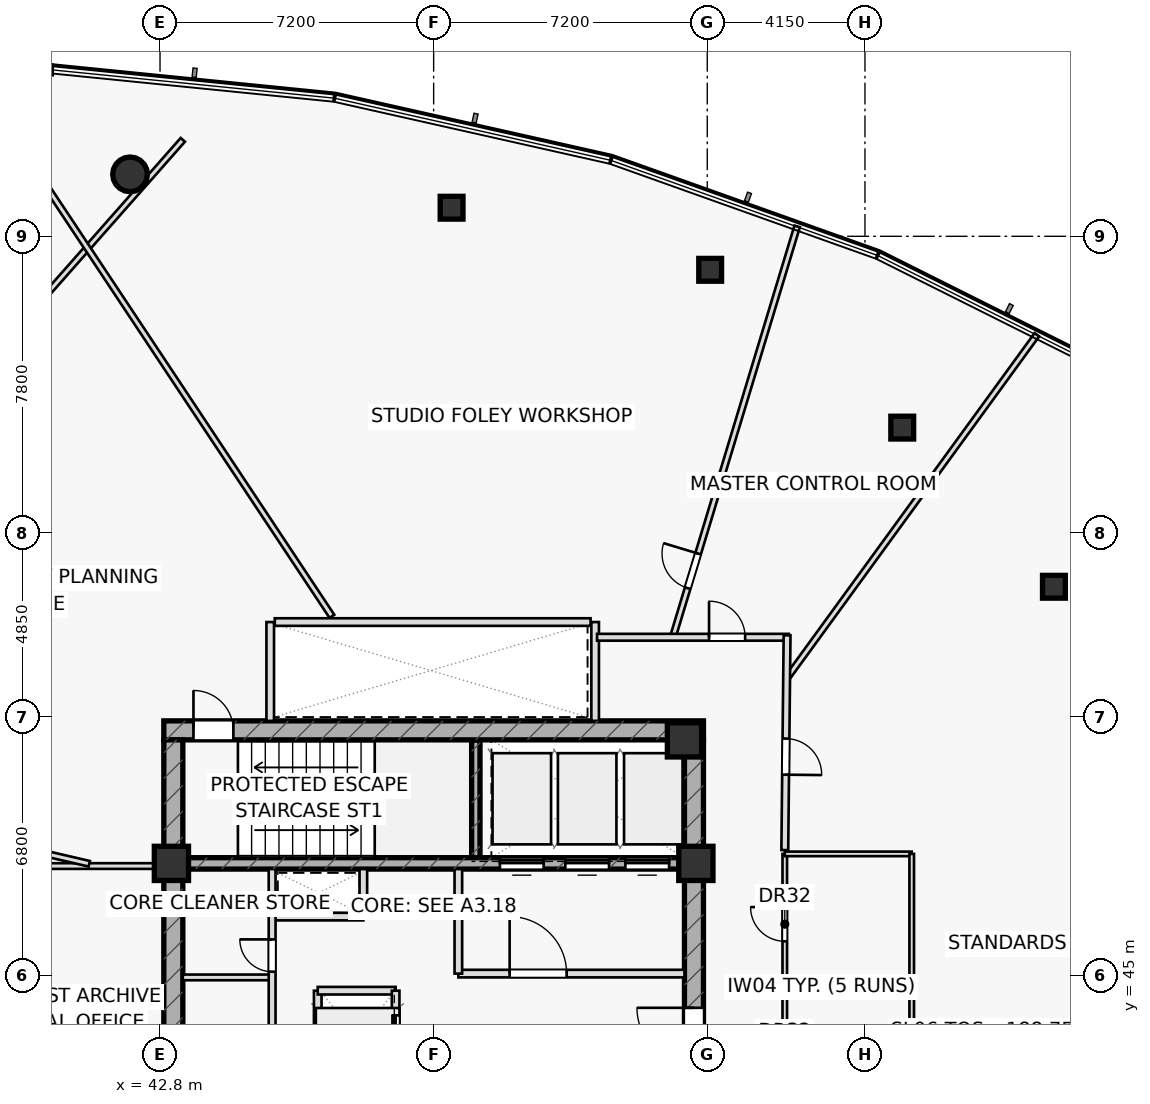
"""IFC4 building model, lengths in metres.
Left out: names, types, materials, properties, quantities, classifications, styles, units other than length and angle.
Written with IfcOpenShell. Run it as: python <this file> out.ifc"""

import sys

from ifc_helpers import new_model, si_unit, direction, frame, frame_2d, origin, origin_2d, place, context, subcontext, project, spatial, rectangle, hollow_rectangle, hollow_circle, extrude, element, fill, save


model = new_model("IFC4")
c1 = context("Model", 3, precision=1e-05, world=origin(), true_north=direction((0.0, 1.0)))
c2 = subcontext(c1, "Body", "Model", "MODEL_VIEW")
j1 = project(units=[si_unit("LENGTHUNIT", "METRE"), si_unit("PLANEANGLEUNIT", "RADIAN")], contexts=[c1])
p1 = place(None, origin())
s1 = spatial("IfcSite", under=j1, at=p1, CompositionType="ELEMENT")
p2 = place(p1, origin())
s2 = spatial("IfcBuilding", under=s1, at=p2, CompositionType="ELEMENT")
p3 = place(p2, frame((0.0, 0.0, 188.75)))
s3 = spatial("IfcBuildingStorey", under=s2, at=p3, CompositionType="ELEMENT", Elevation=188.75)
p4 = place(p3, frame((51.11, 48.1, 0.0), z_axis=(0.0, 0.0, 1.0), x_axis=(0.0, 1.0, 0.0)))
e1 = element("IfcWall", 1, at=p4, inside=s3, PredefinedType="SHEAR", context=c2, shape_type="SweptSolid", body=[
    extrude(rectangle(XDim=3.1, YDim=0.22, at=frame_2d((1.55, 0.0))), origin(), (0.0, 0.0, 1.0), 3.55),
])
p5 = place(p3, frame((42.9, 51.45, 0.0), z_axis=(0.0, 0.0, 1.0), x_axis=(1.0, 0.0, 0.0)))
e2 = element("IfcWall", 2, at=p5, inside=s3, PredefinedType="SHEAR", context=c2, shape_type="SweptSolid", body=[
    extrude(rectangle(XDim=14.2, YDim=0.5, at=frame_2d((7.1, 0.0))), origin(), (0.0, 0.0, 1.0), 3.55),
])
p6 = place(p5, frame((0.78, 0.0, 0.0)))
e3 = element("IfcOpeningElement", 3, at=p6, cuts=e2, PredefinedType="OPENING", context=c2, shape_type="SweptSolid", body=[
    extrude(rectangle(XDim=1.05, YDim=2.2, at=frame_2d((0.525, 1.1))), frame((0.0, 0.26, 0.0), z_axis=(0.0, -1.0, 0.0), x_axis=(1.0, 0.0, 0.0)), (0.0, 0.0, 1.0), 0.52),
])
p7 = place(p3, frame((43.15, 38.8, 0.0), z_axis=(0.0, 0.0, 1.0), x_axis=(0.0, 1.0, 0.0)))
e4 = element("IfcWall", 4, at=p7, inside=s3, PredefinedType="SHEAR", context=c2, shape_type="SweptSolid", body=[
    extrude(rectangle(XDim=12.4, YDim=0.5, at=frame_2d((6.2, 0.0))), origin(), (0.0, 0.0, 1.0), 3.55),
])
p8 = place(p3, frame((56.85, 38.8, 0.0), z_axis=(0.0, 0.0, 1.0), x_axis=(0.0, 1.0, 0.0)))
e5 = element("IfcWall", 5, at=p8, inside=s3, PredefinedType="SHEAR", context=c2, shape_type="SweptSolid", body=[
    extrude(rectangle(XDim=12.4, YDim=0.5, at=frame_2d((6.2, 0.0))), origin(), (0.0, 0.0, 1.0), 3.55),
])
p9 = place(p8, frame((3.85, 0.0, 0.0)))
e6 = element("IfcOpeningElement", 6, at=p9, cuts=e5, PredefinedType="OPENING", context=c2, shape_type="SweptSolid", body=[
    extrude(rectangle(XDim=1.5, YDim=2.2, at=frame_2d((0.75, 1.1))), frame((0.0, 0.26, 0.0), z_axis=(0.0, -1.0, 0.0), x_axis=(1.0, 0.0, 0.0)), (0.0, 0.0, 1.0), 0.52),
])
p10 = place(p3, frame((43.4, 47.95, 0.0), z_axis=(0.0, 0.0, 1.0), x_axis=(1.0, 0.0, 0.0)))
e7 = element("IfcWall", 7, at=p10, inside=s3, PredefinedType="SHEAR", context=c2, shape_type="SweptSolid", body=[
    extrude(rectangle(XDim=13.2, YDim=0.3, at=frame_2d((6.6, 0.0))), origin(), (0.0, 0.0, 1.0), 3.55),
])
p11 = place(p10, frame((8.345, 0.0, 0.0)))
e8 = element("IfcOpeningElement", 8, at=p11, cuts=e7, PredefinedType="OPENING", context=c2, shape_type="SweptSolid", body=[
    extrude(rectangle(XDim=1.15, YDim=2.2, at=frame_2d((0.575, 1.1))), frame((0.0, 0.16, 0.0), z_axis=(0.0, -1.0, 0.0), x_axis=(1.0, 0.0, 0.0)), (0.0, 0.0, 1.0), 0.32),
])
p12 = place(p10, frame((10.065, 0.0, 0.0)))
e9 = element("IfcOpeningElement", 9, at=p12, cuts=e7, PredefinedType="OPENING", context=c2, shape_type="SweptSolid", body=[
    extrude(rectangle(XDim=1.15, YDim=2.2, at=frame_2d((0.575, 1.1))), frame((0.0, 0.16, 0.0), z_axis=(0.0, -1.0, 0.0), x_axis=(1.0, 0.0, 0.0)), (0.0, 0.0, 1.0), 0.32),
])
p13 = place(p10, frame((11.645, 0.0, 0.0)))
e10 = element("IfcOpeningElement", 10, at=p13, cuts=e7, PredefinedType="OPENING", context=c2, shape_type="SweptSolid", body=[
    extrude(rectangle(XDim=1.15, YDim=2.2, at=frame_2d((0.575, 1.1))), frame((0.0, 0.16, 0.0), z_axis=(0.0, -1.0, 0.0), x_axis=(1.0, 0.0, 0.0)), (0.0, 0.0, 1.0), 0.32),
])
for number, where, z_axis, x_axis in (
    (11, (43.1, 47.95, 0.0), (0.0, 0.0, 1.0), (1.0, 0.0, 0.0)),
    (12, (56.9, 47.95, 0.0), (0.0, 0.0, 1.0), (1.0, 0.0, 0.0)),
    (13, (56.6, 51.2, 0.0), (0.0, 0.0, 1.0), (1.0, 0.0, 0.0)),
):
    element("IfcColumn", number, at=place(p3, frame(where, z_axis=z_axis, x_axis=x_axis)), inside=s3, PredefinedType="COLUMN", context=c2, shape_type="SweptSolid", body=[
        extrude(rectangle(XDim=0.9, YDim=0.9, at=origin_2d()), origin(), (0.0, 0.0, 1.0), 3.55),
    ])
p14 = place(p3, frame((42.011, 66.08, 0.0), z_axis=(0.0, 0.0, 1.0), x_axis=(1.0, 0.0, 0.0)))
e14 = element("IfcColumn", 14, at=p14, inside=s3, PredefinedType="COLUMN", context=c2, shape_type="SweptSolid", body=[
    extrude(hollow_circle(Radius=0.457, WallThickness=0.04, at=origin_2d()), origin(), (0.0, 0.0, 1.0), 3.55),
])
for number, where, z_axis, x_axis in (
    (15, (66.322, 55.229, 0.0), (0.0, 0.0, 1.0), (1.0, 0.0, 0.0)),
    (16, (62.331, 59.416, 0.0), (0.0, 0.0, 1.0), (1.0, 0.0, 0.0)),
    (17, (57.277, 63.568, 0.0), (0.0, 0.0, 1.0), (1.0, 0.0, 0.0)),
    (18, (50.472, 65.202, 0.0), (0.0, 0.0, 1.0), (1.0, 0.0, 0.0)),
):
    element("IfcColumn", number, at=place(p3, frame(where, z_axis=z_axis, x_axis=x_axis)), inside=s3, PredefinedType="COLUMN", context=c2, shape_type="SweptSolid", body=[
        extrude(hollow_rectangle(XDim=0.6, YDim=0.6, WallThickness=0.036, at=origin_2d()), origin(), (0.0, 0.0, 1.0), 3.55),
    ])
for number, where, z_axis, x_axis in (
    (19, (45.7, 51.7, 0.0), (0.0, 0.0, 1.0), (0.0, 1.0, 0.0)),
    (20, (54.25, 51.7, 0.0), (0.0, 0.0, 1.0), (0.0, 1.0, 0.0)),
):
    element("IfcWall", number, at=place(p3, frame(where, z_axis=z_axis, x_axis=x_axis)), inside=s3, PredefinedType="PARTITIONING", context=c2, shape_type="SweptSolid", body=[
        extrude(rectangle(XDim=2.6, YDim=0.2, at=frame_2d((1.3, 0.0))), origin(), (0.0, 0.0, 1.0), 3.55),
    ])
p15 = place(p3, frame((45.75, 46.55, 0.0), z_axis=(0.0, 0.0, 1.0), x_axis=(1.0, 0.0, 0.0)))
e21 = element("IfcWall", 21, at=p15, inside=s3, PredefinedType="PARTITIONING", context=c2, shape_type="SweptSolid", body=[
    extrude(rectangle(XDim=2.4, YDim=0.2, at=frame_2d((1.2, 0.0))), origin(), (0.0, 0.0, 1.0), 3.55),
])
p16 = place(p3, frame((48.15, 46.55, 0.0), z_axis=(0.0, 0.0, 1.0), x_axis=(0.0, 1.0, 0.0)))
e22 = element("IfcWall", 22, at=p16, inside=s3, PredefinedType="PARTITIONING", context=c2, shape_type="SweptSolid", body=[
    extrude(rectangle(XDim=1.25, YDim=0.2, at=frame_2d((0.625, 0.0))), origin(), (0.0, 0.0, 1.0), 3.55),
])
p17 = place(p3, frame((46.95, 42.2, 0.0), z_axis=(0.0, 0.0, 1.0), x_axis=(0.0, 1.0, 0.0)))
e23 = element("IfcWall", 23, at=p17, inside=s3, PredefinedType="PARTITIONING", context=c2, shape_type="SweptSolid", body=[
    extrude(rectangle(XDim=2.4, YDim=0.2, at=frame_2d((1.2, 0.0))), origin(), (0.0, 0.0, 1.0), 3.55),
])
p18 = place(p3, frame((46.95, 44.6, 0.0), z_axis=(0.0, 0.0, 1.0), x_axis=(1.0, 0.0, 0.0)))
e24 = element("IfcWall", 24, at=p18, inside=s3, PredefinedType="PARTITIONING", context=c2, shape_type="SweptSolid", body=[
    extrude(rectangle(XDim=2.05, YDim=0.2, at=frame_2d((1.025, 0.0))), origin(), (0.0, 0.0, 1.0), 3.55),
])
p19 = place(p3, frame((50.65, 45.05, 0.0), z_axis=(0.0, 0.0, 1.0), x_axis=(1.0, 0.0, 0.0)))
e25 = element("IfcWall", 25, at=p19, inside=s3, PredefinedType="PARTITIONING", context=c2, shape_type="SweptSolid", body=[
    extrude(rectangle(XDim=5.95, YDim=0.2, at=frame_2d((2.975, 0.0))), origin(), (0.0, 0.0, 1.0), 3.55),
])
p20 = place(p19, frame((1.35, 0.0, 0.0)))
e26 = element("IfcOpeningElement", 26, at=p20, cuts=e25, PredefinedType="OPENING", context=c2, shape_type="SweptSolid", body=[
    extrude(rectangle(XDim=1.5, YDim=2.2, at=frame_2d((0.75, 1.1))), frame((0.0, 0.11, 0.0), z_axis=(0.0, -1.0, 0.0), x_axis=(1.0, 0.0, 0.0)), (0.0, 0.0, 1.0), 0.22),
])
p21 = place(p3, frame((50.65, 45.05, 0.0), z_axis=(0.0, 0.0, 1.0), x_axis=(0.0, 1.0, 0.0)))
e27 = element("IfcWall", 27, at=p21, inside=s3, PredefinedType="PARTITIONING", context=c2, shape_type="SweptSolid", body=[
    extrude(rectangle(XDim=2.75, YDim=0.2, at=frame_2d((1.375, 0.0))), origin(), (0.0, 0.0, 1.0), 3.55),
])
p22 = place(p3, frame((43.4, 44.95, 0.0), z_axis=(0.0, 0.0, 1.0), x_axis=(1.0, 0.0, 0.0)))
e28 = element("IfcWall", 28, at=p22, inside=s3, PredefinedType="PARTITIONING", context=c2, shape_type="SweptSolid", body=[
    extrude(rectangle(XDim=2.35, YDim=0.15, at=frame_2d((1.175, 0.0))), origin(), (0.0, 0.0, 1.0), 3.55),
])
p23 = place(p3, frame((45.75, 42.2, 0.0), z_axis=(0.0, 0.0, 1.0), x_axis=(0.0, 1.0, 0.0)))
e29 = element("IfcWall", 29, at=p23, inside=s3, PredefinedType="PARTITIONING", context=c2, shape_type="SweptSolid", body=[
    extrude(rectangle(XDim=5.6, YDim=0.18, at=frame_2d((2.8, 0.0))), origin(), (0.0, 0.0, 1.0), 3.55),
])
p24 = place(p23, frame((0.55, 0.0, 0.0)))
e30 = element("IfcOpeningElement", 30, at=p24, cuts=e29, PredefinedType="OPENING", context=c2, shape_type="SweptSolid", body=[
    extrude(rectangle(XDim=0.9, YDim=2.05, at=frame_2d((0.45, 1.025))), frame((0.0, 0.1, 0.0), z_axis=(0.0, -1.0, 0.0), x_axis=(1.0, 0.0, 0.0)), (0.0, 0.0, 1.0), 0.2),
])
p25 = place(p23, frame((2.9, 0.0, 0.0)))
e31 = element("IfcOpeningElement", 31, at=p25, cuts=e29, PredefinedType="OPENING", context=c2, shape_type="SweptSolid", body=[
    extrude(rectangle(XDim=0.85, YDim=2.05, at=frame_2d((0.425, 1.025))), frame((0.0, 0.1, 0.0), z_axis=(0.0, -1.0, 0.0), x_axis=(1.0, 0.0, 0.0)), (0.0, 0.0, 1.0), 0.2),
])
p26 = place(p3, frame((43.4, 66.989, 0.0), z_axis=(0.0, 0.0, 1.0), x_axis=(-0.661622343701, -0.749837231881, 0.0)))
e32 = element("IfcWall", 32, at=p26, inside=s3, PredefinedType="PARTITIONING", context=c2, shape_type="SweptSolid", body=[
    extrude(rectangle(XDim=11.427, YDim=0.15, at=frame_2d((5.714, 0.0))), origin(), (0.0, 0.0, 1.0), 2.935),
])
p27 = place(p3, frame((37.14, 47.88, 0.0), z_axis=(0.0, 0.0, 1.0), x_axis=(1.0, 0.0, 0.0)))
e33 = element("IfcWall", 33, at=p27, inside=s3, PredefinedType="PARTITIONING", context=c2, shape_type="SweptSolid", body=[
    extrude(rectangle(XDim=5.76, YDim=0.15, at=frame_2d((2.88, 0.0))), origin(), (0.0, 0.0, 1.0), 2.935),
])
p28 = place(p3, frame((59.24, 41.2, 0.0), z_axis=(0.0, 0.0, 1.0), x_axis=(0.0, 1.0, 0.0)))
e34 = element("IfcWall", 34, at=p28, inside=s3, PredefinedType="PARTITIONING", context=c2, shape_type="SweptSolid", body=[
    extrude(rectangle(XDim=7.0, YDim=0.12, at=frame_2d((3.5, 0.0))), origin(), (0.0, 0.0, 1.0), 3.55),
])
p29 = place(p28, frame((1.15, 0.0, 0.0)))
e35 = element("IfcOpeningElement", 35, at=p29, cuts=e34, PredefinedType="OPENING", context=c2, shape_type="SweptSolid", body=[
    extrude(rectangle(XDim=0.9, YDim=2.05, at=frame_2d((0.45, 1.025))), frame((0.0, 0.07, 0.0), z_axis=(0.0, -1.0, 0.0), x_axis=(1.0, 0.0, 0.0)), (0.0, 0.0, 1.0), 0.14),
])
p30 = place(p28, frame((4.7, 0.0, 0.0)))
e36 = element("IfcOpeningElement", 36, at=p30, cuts=e34, PredefinedType="OPENING", context=c2, shape_type="SweptSolid", body=[
    extrude(rectangle(XDim=0.9, YDim=2.05, at=frame_2d((0.45, 1.025))), frame((0.0, 0.07, 0.0), z_axis=(0.0, -1.0, 0.0), x_axis=(1.0, 0.0, 0.0)), (0.0, 0.0, 1.0), 0.14),
])
for number, where, z_axis, x_axis in (
    (37, (59.24, 44.65, 0.0), (0.0, 0.0, 1.0), (1.0, 0.0, 0.0)),
    (38, (59.24, 48.2, 0.0), (0.0, 0.0, 1.0), (1.0, 0.0, 0.0)),
):
    element("IfcWall", number, at=place(p3, frame(where, z_axis=z_axis, x_axis=x_axis)), inside=s3, PredefinedType="PARTITIONING", context=c2, shape_type="SweptSolid", body=[
        extrude(rectangle(XDim=3.34, YDim=0.12, at=frame_2d((1.67, 0.0))), origin(), (0.0, 0.0, 1.0), 3.55),
    ])
p31 = place(p3, frame((62.58, 41.2, 0.0), z_axis=(0.0, 0.0, 1.0), x_axis=(0.0, 1.0, 0.0)))
e39 = element("IfcWall", 39, at=p31, inside=s3, PredefinedType="PARTITIONING", context=c2, shape_type="SweptSolid", body=[
    extrude(rectangle(XDim=7.0, YDim=0.12, at=frame_2d((3.5, 0.0))), origin(), (0.0, 0.0, 1.0), 3.55),
])
p32 = place(p3, frame((59.289, 52.814, 0.0), z_axis=(0.0, 0.0, 1.0), x_axis=(0.588529724329, 0.808475580077, 0.0)))
e40 = element("IfcWall", 40, at=p32, inside=s3, PredefinedType="PARTITIONING", context=c2, shape_type="SweptSolid", body=[
    extrude(rectangle(XDim=11.189, YDim=0.15, at=frame_2d((5.594, 0.0))), origin(), (0.0, 0.0, 1.0), 3.025),
])
p33 = place(p3, frame((56.294, 53.9, 0.0), z_axis=(0.0, 0.0, 1.0), x_axis=(0.289675037267, 0.95712505598, 0.0)))
e41 = element("IfcWall", 41, at=p33, inside=s3, PredefinedType="PARTITIONING", context=c2, shape_type="SweptSolid", body=[
    extrude(rectangle(XDim=11.295, YDim=0.15, at=frame_2d((5.648, 0.0))), origin(), (0.0, 0.0, 1.0), 2.935),
])
p34 = place(p33, frame((1.35, 0.0, 0.0)))
e42 = element("IfcOpeningElement", 42, at=p34, cuts=e41, PredefinedType="OPENING", context=c2, shape_type="SweptSolid", body=[
    extrude(rectangle(XDim=0.95, YDim=2.05, at=frame_2d((0.475, 1.025))), frame((0.0, 0.085, 0.0), z_axis=(0.0, -1.0, 0.0), x_axis=(1.0, 0.0, 0.0)), (0.0, 0.0, 1.0), 0.17),
])
p35 = place(p3, frame((47.324, 54.45, 0.0), z_axis=(0.0, 0.0, 1.0), x_axis=(-0.553223575902, 0.83303281752, 0.0)))
e43 = element("IfcWall", 43, at=p35, inside=s3, PredefinedType="PARTITIONING", context=c2, shape_type="SweptSolid", body=[
    extrude(rectangle(XDim=17.142, YDim=0.15, at=frame_2d((8.571, 0.0))), origin(), (0.0, 0.0, 1.0), 2.935),
])
p36 = place(p3, frame((40.937, 47.94, 0.0), z_axis=(0.0, 0.0, 1.0), x_axis=(-0.974086065595, 0.226177666479, 0.0)))
e44 = element("IfcWall", 44, at=p36, inside=s3, PredefinedType="PARTITIONING", context=c2, shape_type="SweptSolid", body=[
    extrude(rectangle(XDim=8.453, YDim=0.15, at=frame_2d((4.227, 0.0))), origin(), (0.0, 0.0, 1.0), 2.935),
])
p37 = place(p36, frame((1.35, 0.0, 0.0)))
e45 = element("IfcOpeningElement", 45, at=p37, cuts=e44, PredefinedType="OPENING", context=c2, shape_type="SweptSolid", body=[
    extrude(rectangle(XDim=0.95, YDim=2.05, at=frame_2d((0.475, 1.025))), frame((0.0, 0.085, 0.0), z_axis=(0.0, -1.0, 0.0), x_axis=(1.0, 0.0, 0.0)), (0.0, 0.0, 1.0), 0.17),
])
p38 = place(p3, frame((54.3, 53.9, 0.0), z_axis=(0.0, 0.0, 1.0), x_axis=(1.0, 0.0, 0.0)))
e46 = element("IfcWall", 46, at=p38, inside=s3, PredefinedType="PARTITIONING", context=c2, shape_type="SweptSolid", body=[
    extrude(rectangle(XDim=5.05, YDim=0.18, at=frame_2d((2.525, 0.0))), origin(), (0.0, 0.0, 1.0), 2.935),
])
p39 = place(p38, frame((2.947, 0.0, 0.0)))
e47 = element("IfcOpeningElement", 47, at=p39, cuts=e46, PredefinedType="OPENING", context=c2, shape_type="SweptSolid", body=[
    extrude(rectangle(XDim=0.95, YDim=2.05, at=frame_2d((0.475, 1.025))), frame((0.0, 0.1, 0.0), z_axis=(0.0, -1.0, 0.0), x_axis=(1.0, 0.0, 0.0)), (0.0, 0.0, 1.0), 0.2),
])
p40 = place(p3, frame((59.301, 53.95, 0.0), z_axis=(0.0, 0.0, 1.0), x_axis=(-0.010629422803, -0.99994350609, 0.0)))
e48 = element("IfcWall", 48, at=p40, inside=s3, PredefinedType="PARTITIONING", context=c2, shape_type="SweptSolid", body=[
    extrude(rectangle(XDim=5.65, YDim=0.18, at=frame_2d((2.825, 0.0))), origin(), (0.0, 0.0, 1.0), 2.935),
])
p41 = place(p40, frame((2.716, 0.0, 0.0)))
e49 = element("IfcOpeningElement", 49, at=p41, cuts=e48, PredefinedType="OPENING", context=c2, shape_type="SweptSolid", body=[
    extrude(rectangle(XDim=0.95, YDim=2.05, at=frame_2d((0.475, 1.025))), frame((0.0, 0.1, 0.0), z_axis=(0.0, -1.0, 0.0), x_axis=(1.0, 0.0, 0.0)), (0.0, 0.0, 1.0), 0.2),
])
p42 = place(p3, frame((39.975, 68.828, 0.0), z_axis=(0.0, 0.0, 1.0), x_axis=(-0.999969682786, -0.007786752114, 0.0)))
e50 = element("IfcWall", 50, at=p42, inside=s3, PredefinedType="STANDARD", context=c2, shape_type="SweptSolid", body=[
    extrude(rectangle(XDim=1.944, YDim=0.28, at=frame_2d((0.972, 0.0))), origin(), (0.0, 0.0, 1.0), 3.55),
])
p43 = place(p3, frame((49.0, 42.2, 0.0), z_axis=(0.0, 0.0, 1.0), x_axis=(0.0, 1.0, 0.0)))
e51 = element("IfcWall", 51, at=p43, inside=s3, PredefinedType="PARTITIONING", context=c2, shape_type="SweptSolid", body=[
    extrude(rectangle(XDim=2.4, YDim=0.2, at=frame_2d((1.2, 0.0))), origin(), (0.0, 0.0, 1.0), 3.55),
])
p44 = place(p43, frame((0.65, 0.0, 0.0)))
e52 = element("IfcOpeningElement", 52, at=p44, cuts=e51, PredefinedType="OPENING", context=c2, shape_type="SweptSolid", body=[
    extrude(rectangle(XDim=1.1, YDim=2.15, at=frame_2d((0.55, 1.075))), frame((0.0, 0.11, 0.0), z_axis=(0.0, -1.0, 0.0), x_axis=(1.0, 0.0, 0.0)), (0.0, 0.0, 1.0), 0.22),
])
p45 = place(p3, frame((45.82, 54.3, 0.0), z_axis=(0.0, 0.0, 1.0), x_axis=(1.0, 0.0, 0.0)))
e53 = element("IfcWall", 53, at=p45, inside=s3, PredefinedType="PARTITIONING", context=c2, shape_type="SweptSolid", body=[
    extrude(rectangle(XDim=8.31, YDim=0.2, at=frame_2d((4.155, 0.0))), origin(), (0.0, 0.0, 1.0), 3.55),
])
p46 = place(p6, origin())
e54 = element("IfcDoor", 54, at=p46, inside=s3, OperationType="SINGLE_SWING_LEFT", PredefinedType="DOOR", context=c2, shape_type="SweptSolid", body=[
    extrude(rectangle(XDim=1.05, YDim=2.2, at=frame_2d((0.525, 1.1))), frame((0.0, 0.025, 0.0), z_axis=(0.0, -1.0, 0.0), x_axis=(1.0, 0.0, 0.0)), (0.0, 0.0, 1.0), 0.05),
])
fill(e3, e54)
p47 = place(p9, origin())
e55 = element("IfcDoor", 55, at=p47, inside=s3, OperationType="SINGLE_SWING_RIGHT", PredefinedType="DOOR", context=c2, shape_type="SweptSolid", body=[
    extrude(rectangle(XDim=1.5, YDim=2.2, at=frame_2d((0.75, 1.1))), frame((0.0, 0.025, 0.0), z_axis=(0.0, -1.0, 0.0), x_axis=(1.0, 0.0, 0.0)), (0.0, 0.0, 1.0), 0.05),
])
fill(e6, e55)
p48 = place(p20, origin())
e56 = element("IfcDoor", 56, at=p48, inside=s3, OperationType="SINGLE_SWING_LEFT", PredefinedType="DOOR", context=c2, shape_type="SweptSolid", body=[
    extrude(rectangle(XDim=1.5, YDim=2.2, at=frame_2d((0.75, 1.1))), frame((0.0, 0.025, 0.0), z_axis=(0.0, -1.0, 0.0), x_axis=(1.0, 0.0, 0.0)), (0.0, 0.0, 1.0), 0.05),
])
fill(e26, e56)
p49 = place(p25, origin())
e57 = element("IfcDoor", 57, at=p49, inside=s3, OperationType="SINGLE_SWING_RIGHT", PredefinedType="DOOR", context=c2, shape_type="SweptSolid", body=[
    extrude(rectangle(XDim=0.85, YDim=2.05, at=frame_2d((0.425, 1.025))), frame((0.0, 0.025, 0.0), z_axis=(0.0, -1.0, 0.0), x_axis=(1.0, 0.0, 0.0)), (0.0, 0.0, 1.0), 0.05),
])
fill(e31, e57)
p50 = place(p30, origin())
e58 = element("IfcDoor", 58, at=p50, inside=s3, OperationType="SINGLE_SWING_RIGHT", PredefinedType="DOOR", context=c2, shape_type="SweptSolid", body=[
    extrude(rectangle(XDim=0.9, YDim=2.05, at=frame_2d((0.45, 1.025))), frame((0.0, 0.025, 0.0), z_axis=(0.0, -1.0, 0.0), x_axis=(1.0, 0.0, 0.0)), (0.0, 0.0, 1.0), 0.05),
])
fill(e36, e58)
p51 = place(p34, origin())
e59 = element("IfcDoor", 59, at=p51, inside=s3, OperationType="SINGLE_SWING_RIGHT", PredefinedType="DOOR", context=c2, shape_type="SweptSolid", body=[
    extrude(rectangle(XDim=0.95, YDim=2.05, at=frame_2d((0.475, 1.025))), frame((0.0, 0.025, 0.0), z_axis=(0.0, -1.0, 0.0), x_axis=(1.0, 0.0, 0.0)), (0.0, 0.0, 1.0), 0.05),
])
fill(e42, e59)
p52 = place(p39, origin())
e60 = element("IfcDoor", 60, at=p52, inside=s3, OperationType="SINGLE_SWING_LEFT", PredefinedType="DOOR", context=c2, shape_type="SweptSolid", body=[
    extrude(rectangle(XDim=0.95, YDim=2.05, at=frame_2d((0.475, 1.025))), frame((0.0, 0.025, 0.0), z_axis=(0.0, -1.0, 0.0), x_axis=(1.0, 0.0, 0.0)), (0.0, 0.0, 1.0), 0.05),
])
fill(e47, e60)
p53 = place(p41, origin())
e61 = element("IfcDoor", 61, at=p53, inside=s3, OperationType="SINGLE_SWING_RIGHT", PredefinedType="DOOR", context=c2, shape_type="SweptSolid", body=[
    extrude(rectangle(XDim=0.95, YDim=2.05, at=frame_2d((0.475, 1.025))), frame((0.0, 0.025, 0.0), z_axis=(0.0, -1.0, 0.0), x_axis=(1.0, 0.0, 0.0)), (0.0, 0.0, 1.0), 0.05),
])
fill(e49, e61)
p54 = place(p11, origin())
e62 = element("IfcDoor", 62, at=p54, inside=s3, OperationType="SLIDING_TO_LEFT", PredefinedType="DOOR", context=c2, shape_type="SweptSolid", body=[
    extrude(rectangle(XDim=1.15, YDim=2.2, at=frame_2d((0.575, 1.1))), frame((0.0, 0.025, 0.0), z_axis=(0.0, -1.0, 0.0), x_axis=(1.0, 0.0, 0.0)), (0.0, 0.0, 1.0), 0.05),
])
fill(e8, e62)
p55 = place(p12, origin())
e63 = element("IfcDoor", 63, at=p55, inside=s3, OperationType="SLIDING_TO_LEFT", PredefinedType="DOOR", context=c2, shape_type="SweptSolid", body=[
    extrude(rectangle(XDim=1.15, YDim=2.2, at=frame_2d((0.575, 1.1))), frame((0.0, 0.025, 0.0), z_axis=(0.0, -1.0, 0.0), x_axis=(1.0, 0.0, 0.0)), (0.0, 0.0, 1.0), 0.05),
])
fill(e9, e63)
p56 = place(p13, origin())
e64 = element("IfcDoor", 64, at=p56, inside=s3, OperationType="SLIDING_TO_LEFT", PredefinedType="DOOR", context=c2, shape_type="SweptSolid", body=[
    extrude(rectangle(XDim=1.15, YDim=2.2, at=frame_2d((0.575, 1.1))), frame((0.0, 0.025, 0.0), z_axis=(0.0, -1.0, 0.0), x_axis=(1.0, 0.0, 0.0)), (0.0, 0.0, 1.0), 0.05),
])
fill(e10, e64)
p57 = place(p44, origin())
e65 = element("IfcDoor", 65, at=p57, inside=s3, OperationType="SLIDING_TO_RIGHT", PredefinedType="DOOR", context=c2, shape_type="SweptSolid", body=[
    extrude(rectangle(XDim=1.1, YDim=2.15, at=frame_2d((0.55, 1.075))), frame((0.0, 0.025, 0.0), z_axis=(0.0, -1.0, 0.0), x_axis=(1.0, 0.0, 0.0)), (0.0, 0.0, 1.0), 0.05),
])
fill(e52, e65)
save(model, sys.argv[1])
